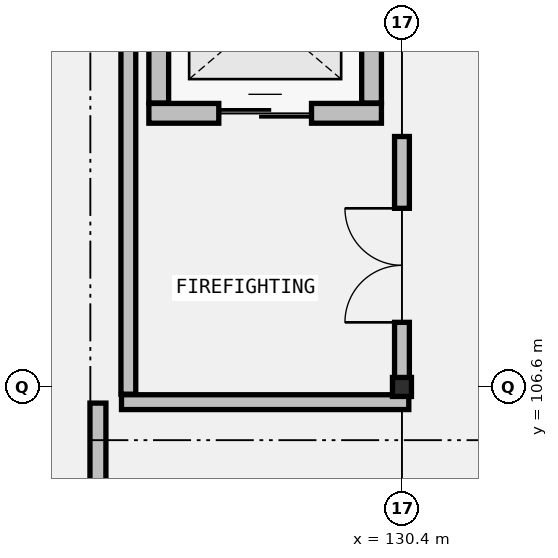
"""IFC4 building model, lengths in metres.
Left out: names, types, materials, properties, quantities, classifications, styles, units other than length and angle.
Written with IfcOpenShell. Run it as: python <this file> out.ifc"""

import sys

from ifc_helpers import new_model, si_unit, direction, frame, frame_2d, origin, origin_2d, place, context, subcontext, project, spatial, rectangle, i_section, extrude, element, fill, save


model = new_model("IFC4")
c1 = context("Model", 3, precision=1e-05, world=origin(), true_north=direction((0.0, 1.0)))
c2 = subcontext(c1, "Body", "Model", "MODEL_VIEW")
j1 = project(units=[si_unit("LENGTHUNIT", "METRE"), si_unit("PLANEANGLEUNIT", "RADIAN")], contexts=[c1])
p1 = place(None, origin())
s1 = spatial("IfcSite", under=j1, at=p1, CompositionType="ELEMENT")
p2 = place(p1, origin())
s2 = spatial("IfcBuilding", under=s1, at=p2, CompositionType="ELEMENT")
p3 = place(p2, frame((0.0, 0.0, 23.8)))
s3 = spatial("IfcBuildingStorey", under=s2, at=p3, CompositionType="ELEMENT", Elevation=23.8)
p4 = place(p3, frame((130.4, 106.6, 0.0), z_axis=(0.0, 0.0, 1.0), x_axis=(1.0, 0.0, 0.0)))
e1 = element("IfcColumn", 1, at=p4, inside=s3, PredefinedType="COLUMN", context=c2, shape_type="SweptSolid", body=[
    extrude(i_section(OverallWidth=0.25, OverallDepth=0.25, WebThickness=0.009, FlangeThickness=0.014, FilletRadius=0.016, at=origin_2d()), origin(), (0.0, 0.0, 1.0), 4.8),
])
p5 = place(p3, frame((127.07, 110.2, 0.0), z_axis=(0.0, 0.0, 1.0), x_axis=(1.0, 0.0, 0.0)))
e2 = element("IfcWall", 2, at=p5, inside=s3, PredefinedType="STANDARD", context=c2, shape_type="SweptSolid", body=[
    extrude(rectangle(XDim=3.06, YDim=0.26, at=frame_2d((1.53, 0.0))), origin(), (0.0, 0.0, 1.0), 4.56),
])
p6 = place(p5, frame((0.92, 0.0, 0.0)))
e3 = element("IfcOpeningElement", 3, at=p6, cuts=e2, PredefinedType="OPENING", context=c2, shape_type="SweptSolid", body=[
    extrude(rectangle(XDim=1.22, YDim=2.2, at=frame_2d((0.61, 1.1))), frame((0.0, 0.14, 0.0), z_axis=(0.0, -1.0, 0.0), x_axis=(1.0, 0.0, 0.0)), (0.0, 0.0, 1.0), 0.28),
])
for number, where, z_axis, x_axis in (
    (4, (127.2, 110.336, 0.0), (0.0, 0.0, 1.0), (0.0, 1.0, 0.0)),
    (5, (130.0, 110.336, 0.0), (0.0, 0.0, 1.0), (0.0, 1.0, 0.0)),
):
    element("IfcWall", number, at=place(p3, frame(where, z_axis=z_axis, x_axis=x_axis)), inside=s3, PredefinedType="STANDARD", context=c2, shape_type="SweptSolid", body=[
        extrude(rectangle(XDim=2.328, YDim=0.26, at=frame_2d((1.164, 0.0))), origin(), (0.0, 0.0, 1.0), 4.56),
    ])
p7 = place(p3, frame((126.8, 106.505, 0.0), z_axis=(0.0, 0.0, 1.0), x_axis=(0.0, 1.0, 0.0)))
e6 = element("IfcWall", 6, at=p7, inside=s3, PredefinedType="PARTITIONING", context=c2, shape_type="SweptSolid", body=[
    extrude(rectangle(XDim=7.275, YDim=0.195, at=frame_2d((3.638, 0.0))), origin(), (0.0, 0.0, 1.0), 4.088),
])
p8 = place(p3, frame((126.71, 106.4, 0.0), z_axis=(0.0, 0.0, 1.0), x_axis=(1.0, 0.0, 0.0)))
e7 = element("IfcWall", 7, at=p8, inside=s3, PredefinedType="PARTITIONING", context=c2, shape_type="SweptSolid", body=[
    extrude(rectangle(XDim=3.78, YDim=0.195, at=frame_2d((1.89, 0.0))), origin(), (0.0, 0.0, 1.0), 4.088),
])
p9 = place(p3, frame((130.4, 106.505, 0.0), z_axis=(0.0, 0.0, 1.0), x_axis=(0.0, 1.0, 0.0)))
e8 = element("IfcWall", 8, at=p9, inside=s3, PredefinedType="PARTITIONING", context=c2, shape_type="SweptSolid", body=[
    extrude(rectangle(XDim=3.39, YDim=0.195, at=frame_2d((1.695, 0.0))), origin(), (0.0, 0.0, 1.0), 4.088),
])
p10 = place(p9, frame((0.945, 0.0, 0.0)))
e9 = element("IfcOpeningElement", 9, at=p10, cuts=e8, PredefinedType="OPENING", context=c2, shape_type="SweptSolid", body=[
    extrude(rectangle(XDim=1.5, YDim=2.2, at=frame_2d((0.75, 1.1))), frame((0.0, 0.107, 0.0), z_axis=(0.0, -1.0, 0.0), x_axis=(1.0, 0.0, 0.0)), (0.0, 0.0, 1.0), 0.215),
])
p11 = place(p3, frame((126.4, 102.513, 0.0), z_axis=(0.0, 0.0, 1.0), x_axis=(0.0, 1.0, 0.0)))
e10 = element("IfcWall", 10, at=p11, inside=s3, PredefinedType="PARTITIONING", context=c2, shape_type="SweptSolid", body=[
    extrude(rectangle(XDim=3.875, YDim=0.21, at=frame_2d((1.937, 0.0))), origin(), (0.0, 0.0, 1.0), 4.088),
])
p12 = place(p11, frame((1.347, 0.0, 0.0)))
e11 = element("IfcOpeningElement", 11, at=p12, cuts=e10, PredefinedType="OPENING", context=c2, shape_type="SweptSolid", body=[
    extrude(rectangle(XDim=1.18, YDim=2.22, at=frame_2d((0.59, 1.11))), frame((0.0, 0.115, 0.0), z_axis=(0.0, -1.0, 0.0), x_axis=(1.0, 0.0, 0.0)), (0.0, 0.0, 1.0), 0.23),
])
p13 = place(p6, origin())
e12 = element("IfcDoor", 12, at=p13, inside=s3, OperationType="SLIDING_TO_RIGHT", PredefinedType="DOOR", context=c2, shape_type="SweptSolid", body=[
    extrude(rectangle(XDim=1.22, YDim=2.2, at=frame_2d((0.61, 1.1))), frame((0.0, 0.025, 0.0), z_axis=(0.0, -1.0, 0.0), x_axis=(1.0, 0.0, 0.0)), (0.0, 0.0, 1.0), 0.05),
])
fill(e3, e12)
p14 = place(p10, origin())
e13 = element("IfcDoor", 13, at=p14, inside=s3, OperationType="DOUBLE_DOOR_SINGLE_SWING", PredefinedType="DOOR", context=c2, shape_type="SweptSolid", body=[
    extrude(rectangle(XDim=1.5, YDim=2.2, at=frame_2d((0.75, 1.1))), frame((0.0, 0.025, 0.0), z_axis=(0.0, -1.0, 0.0), x_axis=(1.0, 0.0, 0.0)), (0.0, 0.0, 1.0), 0.05),
])
fill(e9, e13)
save(model, sys.argv[1])
